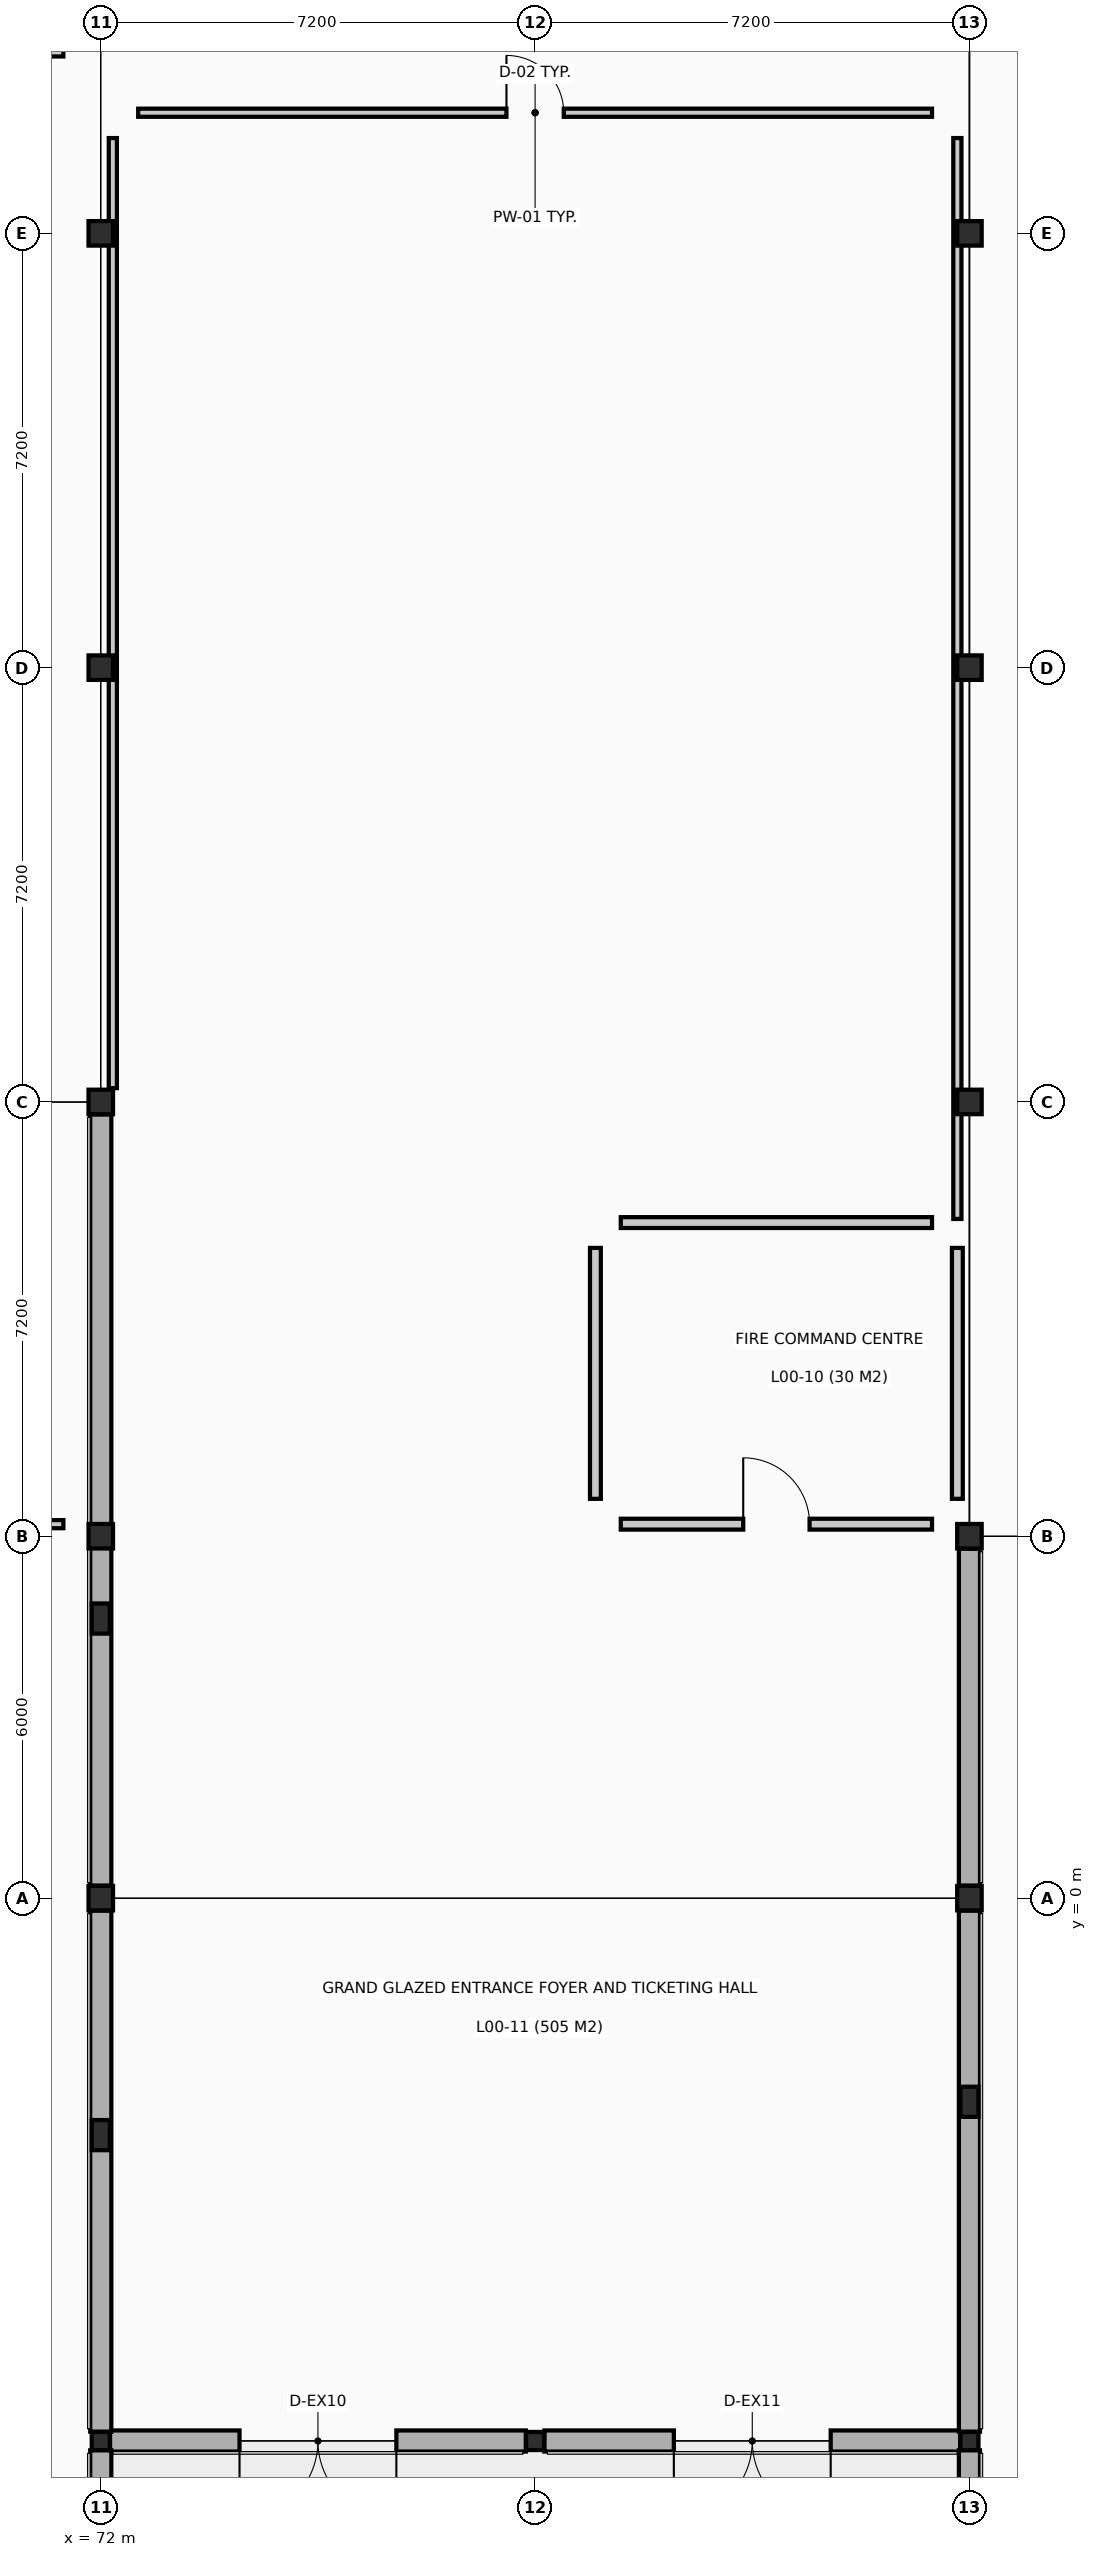
"""IFC4 building model, lengths in metres.
Left out: names, types, materials, properties, quantities, classifications, styles, units other than length and angle.
Written with IfcOpenShell. Run it as: python <this file> out.ifc"""

import sys

from ifc_helpers import new_model, si_unit, direction, frame, frame_2d, origin, origin_2d, place, context, subcontext, project, spatial, rectangle, hollow_rectangle, hollow_circle, i_section, extrude, element, fill, save


model = new_model("IFC4")
c1 = context("Model", 3, precision=1e-05, world=origin(), true_north=direction((0.0, 1.0)))
c2 = subcontext(c1, "Body", "Model", "MODEL_VIEW")
j1 = project(units=[si_unit("LENGTHUNIT", "METRE"), si_unit("PLANEANGLEUNIT", "RADIAN")], contexts=[c1])
p1 = place(None, origin())
s1 = spatial("IfcSite", under=j1, at=p1, CompositionType="ELEMENT")
p2 = place(p1, origin())
s2 = spatial("IfcBuilding", under=s1, at=p2, CompositionType="ELEMENT")
p3 = place(p2, origin())
s3 = spatial("IfcBuildingStorey", under=s2, at=p3, CompositionType="ELEMENT", Elevation=0.0)
for number, where, z_axis, x_axis in (
    (1, (72.0, 0.0, 0.0), (0.0, 0.0, 1.0), (1.0, 0.0, 0.0)),
    (2, (72.0, 6.0, 0.0), (0.0, 0.0, 1.0), (1.0, 0.0, 0.0)),
    (3, (72.0, 13.2, 0.0), (0.0, 0.0, 1.0), (1.0, 0.0, 0.0)),
    (4, (72.0, 20.4, 0.0), (0.0, 0.0, 1.0), (1.0, 0.0, 0.0)),
    (5, (72.0, 27.6, 0.0), (0.0, 0.0, 1.0), (1.0, 0.0, 0.0)),
    (6, (86.4, 0.0, 0.0), (0.0, 0.0, 1.0), (1.0, 0.0, 0.0)),
    (7, (86.4, 6.0, 0.0), (0.0, 0.0, 1.0), (1.0, 0.0, 0.0)),
    (8, (86.4, 13.2, 0.0), (0.0, 0.0, 1.0), (1.0, 0.0, 0.0)),
    (9, (86.4, 20.4, 0.0), (0.0, 0.0, 1.0), (1.0, 0.0, 0.0)),
    (10, (86.4, 27.6, 0.0), (0.0, 0.0, 1.0), (1.0, 0.0, 0.0)),
):
    element("IfcColumn", number, at=place(p3, frame(where, z_axis=z_axis, x_axis=x_axis)), inside=s3, PredefinedType="COLUMN", context=c2, shape_type="SweptSolid", body=[
        extrude(hollow_circle(Radius=0.203, WallThickness=0.016, at=origin_2d()), origin(), (0.0, 0.0, 1.0), 4.8),
    ])
for number, where, z_axis, x_axis in (
    (11, (72.0, -3.929, 0.0), (0.0, 0.0, 1.0), (1.0, 0.0, 0.0)),
    (12, (72.0, 4.635, 0.0), (0.0, 0.0, 1.0), (1.0, 0.0, 0.0)),
    (13, (86.4, -3.376, 0.0), (0.0, 0.0, 1.0), (1.0, 0.0, 0.0)),
):
    element("IfcColumn", number, at=place(p3, frame(where, z_axis=z_axis, x_axis=x_axis)), inside=s3, PredefinedType="COLUMN", context=c2, shape_type="SweptSolid", body=[
        extrude(i_section(OverallWidth=0.3, OverallDepth=0.5, WebThickness=0.014, FlangeThickness=0.028, at=origin_2d()), origin(), (0.0, 0.0, 1.0), 4.8),
    ])
for number, where, z_axis, x_axis in (
    (14, (72.0, -9.0, 0.0), (0.0, 0.0, 1.0), (1.0, 0.0, 0.0)),
    (15, (79.2, -9.0, 0.0), (0.0, 0.0, 1.0), (1.0, 0.0, 0.0)),
    (16, (86.4, -9.0, 0.0), (0.0, 0.0, 1.0), (1.0, 0.0, 0.0)),
):
    element("IfcColumn", number, at=place(p3, frame(where, z_axis=z_axis, x_axis=x_axis)), inside=s3, PredefinedType="COLUMN", context=c2, shape_type="SweptSolid", body=[
        extrude(hollow_rectangle(XDim=0.3, YDim=0.3, WallThickness=0.012, at=origin_2d()), origin(), (0.0, 0.0, 1.0), 4.8),
    ])
p4 = place(p3, frame((72.154, -9.0, 0.0), z_axis=(0.0, 0.0, 1.0), x_axis=(1.0, 0.0, 0.0)))
e17 = element("IfcWall", 17, at=p4, inside=s3, PredefinedType="SOLIDWALL", context=c2, shape_type="SweptSolid", body=[
    extrude(rectangle(XDim=6.892, YDim=0.35, at=frame_2d((3.446, 0.0))), origin(), (0.0, 0.0, 1.0), 4.065),
])
p5 = place(p4, frame((2.146, 0.0, 0.0)))
e18 = element("IfcOpeningElement", 18, at=p5, cuts=e17, PredefinedType="OPENING", context=c2, shape_type="SweptSolid", body=[
    extrude(rectangle(XDim=2.6, YDim=2.7, at=frame_2d((1.3, 1.35))), frame((0.0, 0.185, 0.0), z_axis=(0.0, -1.0, 0.0), x_axis=(1.0, 0.0, 0.0)), (0.0, 0.0, 1.0), 0.37),
])
p6 = place(p3, frame((79.354, -9.0, 0.0), z_axis=(0.0, 0.0, 1.0), x_axis=(1.0, 0.0, 0.0)))
e19 = element("IfcWall", 19, at=p6, inside=s3, PredefinedType="SOLIDWALL", context=c2, shape_type="SweptSolid", body=[
    extrude(rectangle(XDim=6.892, YDim=0.35, at=frame_2d((3.446, 0.0))), origin(), (0.0, 0.0, 1.0), 4.065),
])
p7 = place(p6, frame((2.146, 0.0, 0.0)))
e20 = element("IfcOpeningElement", 20, at=p7, cuts=e19, PredefinedType="OPENING", context=c2, shape_type="SweptSolid", body=[
    extrude(rectangle(XDim=2.6, YDim=2.7, at=frame_2d((1.3, 1.35))), frame((0.0, 0.185, 0.0), z_axis=(0.0, -1.0, 0.0), x_axis=(1.0, 0.0, 0.0)), (0.0, 0.0, 1.0), 0.37),
])
p8 = place(p3, frame((72.0, -12.599, 0.0), z_axis=(0.0, 0.0, 1.0), x_axis=(0.0, 1.0, 0.0)))
e21 = element("IfcWall", 21, at=p8, inside=s3, PredefinedType="SOLIDWALL", context=c2, shape_type="SweptSolid", body=[
    extrude(rectangle(XDim=3.445, YDim=0.35, at=frame_2d((1.722, 0.0))), origin(), (0.0, 0.0, 1.0), 4.115),
])
p9 = place(p3, frame((72.0, -8.846, 0.0), z_axis=(0.0, 0.0, 1.0), x_axis=(0.0, 1.0, 0.0)))
e22 = element("IfcWall", 22, at=p9, inside=s3, PredefinedType="SOLIDWALL", context=c2, shape_type="SweptSolid", body=[
    extrude(rectangle(XDim=8.639, YDim=0.35, at=frame_2d((4.319, 0.0))), origin(), (0.0, 0.0, 1.0), 4.115),
])
p10 = place(p3, frame((72.0, 0.207, 0.0), z_axis=(0.0, 0.0, 1.0), x_axis=(0.0, 1.0, 0.0)))
e23 = element("IfcWall", 23, at=p10, inside=s3, PredefinedType="SOLIDWALL", context=c2, shape_type="SweptSolid", body=[
    extrude(rectangle(XDim=12.786, YDim=0.35, at=frame_2d((6.393, 0.0))), origin(), (0.0, 0.0, 1.0), 4.115),
])
p11 = place(p3, frame((86.4, -12.599, 0.0), z_axis=(0.0, 0.0, 1.0), x_axis=(0.0, 1.0, 0.0)))
e24 = element("IfcWall", 24, at=p11, inside=s3, PredefinedType="SOLIDWALL", context=c2, shape_type="SweptSolid", body=[
    extrude(rectangle(XDim=3.445, YDim=0.35, at=frame_2d((1.722, 0.0))), origin(), (0.0, 0.0, 1.0), 4.115),
])
p12 = place(p3, frame((86.4, -8.846, 0.0), z_axis=(0.0, 0.0, 1.0), x_axis=(0.0, 1.0, 0.0)))
e25 = element("IfcWall", 25, at=p12, inside=s3, PredefinedType="SOLIDWALL", context=c2, shape_type="SweptSolid", body=[
    extrude(rectangle(XDim=8.639, YDim=0.35, at=frame_2d((4.319, 0.0))), origin(), (0.0, 0.0, 1.0), 4.115),
])
p13 = place(p3, frame((86.4, 0.207, 0.0), z_axis=(0.0, 0.0, 1.0), x_axis=(0.0, 1.0, 0.0)))
e26 = element("IfcWall", 26, at=p13, inside=s3, PredefinedType="SOLIDWALL", context=c2, shape_type="SweptSolid", body=[
    extrude(rectangle(XDim=5.585, YDim=0.35, at=frame_2d((2.793, 0.0))), origin(), (0.0, 0.0, 1.0), 4.115),
])
p14 = place(p3, frame((80.62, 6.2, 0.0), z_axis=(0.0, 0.0, 1.0), x_axis=(1.0, 0.0, 0.0)))
e27 = element("IfcWall", 27, at=p14, inside=s3, PredefinedType="PARTITIONING", context=c2, shape_type="SweptSolid", body=[
    extrude(rectangle(XDim=5.16, YDim=0.18, at=frame_2d((2.58, 0.0))), origin(), (0.0, 0.0, 1.0), 4.565),
])
p15 = place(p14, frame((2.03, 0.0, 0.0)))
e28 = element("IfcOpeningElement", 28, at=p15, cuts=e27, PredefinedType="OPENING", context=c2, shape_type="SweptSolid", body=[
    extrude(rectangle(XDim=1.1, YDim=2.15, at=frame_2d((0.55, 1.075))), frame((0.0, 0.1, 0.0), z_axis=(0.0, -1.0, 0.0), x_axis=(1.0, 0.0, 0.0)), (0.0, 0.0, 1.0), 0.2),
])
p16 = place(p3, frame((80.62, 11.2, 0.0), z_axis=(0.0, 0.0, 1.0), x_axis=(1.0, 0.0, 0.0)))
e29 = element("IfcWall", 29, at=p16, inside=s3, PredefinedType="PARTITIONING", context=c2, shape_type="SweptSolid", body=[
    extrude(rectangle(XDim=5.16, YDim=0.18, at=frame_2d((2.58, 0.0))), origin(), (0.0, 0.0, 1.0), 4.565),
])
p17 = place(p3, frame((80.2, 6.62, 0.0), z_axis=(0.0, 0.0, 1.0), x_axis=(0.0, 1.0, 0.0)))
e30 = element("IfcWall", 30, at=p17, inside=s3, PredefinedType="PARTITIONING", context=c2, shape_type="SweptSolid", body=[
    extrude(rectangle(XDim=4.16, YDim=0.18, at=frame_2d((2.08, 0.0))), origin(), (0.0, 0.0, 1.0), 4.565),
])
p18 = place(p3, frame((86.2, 6.62, 0.0), z_axis=(0.0, 0.0, 1.0), x_axis=(0.0, 1.0, 0.0)))
e31 = element("IfcWall", 31, at=p18, inside=s3, PredefinedType="PARTITIONING", context=c2, shape_type="SweptSolid", body=[
    extrude(rectangle(XDim=4.16, YDim=0.18, at=frame_2d((2.08, 0.0))), origin(), (0.0, 0.0, 1.0), 4.11),
])
p19 = place(p3, frame((72.62, 29.6, 0.0), z_axis=(0.0, 0.0, 1.0), x_axis=(1.0, 0.0, 0.0)))
e32 = element("IfcWall", 32, at=p19, inside=s3, PredefinedType="PARTITIONING", context=c2, shape_type="SweptSolid", body=[
    extrude(rectangle(XDim=13.16, YDim=0.135, at=frame_2d((6.58, 0.0))), origin(), (0.0, 0.0, 1.0), 4.565),
])
p20 = place(p19, frame((6.105, 0.0, 0.0)))
e33 = element("IfcOpeningElement", 33, at=p20, cuts=e32, PredefinedType="OPENING", context=c2, shape_type="SweptSolid", body=[
    extrude(rectangle(XDim=0.95, YDim=2.1, at=frame_2d((0.475, 1.05))), frame((0.0, 0.077, 0.0), z_axis=(0.0, -1.0, 0.0), x_axis=(1.0, 0.0, 0.0)), (0.0, 0.0, 1.0), 0.155),
])
p21 = place(p3, frame((72.2, 13.428, 0.0), z_axis=(0.0, 0.0, 1.0), x_axis=(0.0, 1.0, 0.0)))
e34 = element("IfcWall", 34, at=p21, inside=s3, PredefinedType="PARTITIONING", context=c2, shape_type="SweptSolid", body=[
    extrude(rectangle(XDim=15.751, YDim=0.135, at=frame_2d((7.876, 0.0))), origin(), (0.0, 0.0, 1.0), 4.11),
])
p22 = place(p3, frame((86.2, 11.26, 0.0), z_axis=(0.0, 0.0, 1.0), x_axis=(0.0, 1.0, 0.0)))
e35 = element("IfcWall", 35, at=p22, inside=s3, PredefinedType="PARTITIONING", context=c2, shape_type="SweptSolid", body=[
    extrude(rectangle(XDim=17.92, YDim=0.135, at=frame_2d((8.96, 0.0))), origin(), (0.0, 0.0, 1.0), 4.11),
])
p23 = place(p3, frame((58.02, 6.2, 0.0), z_axis=(0.0, 0.0, 1.0), x_axis=(1.0, 0.0, 0.0)))
e36 = element("IfcWall", 36, at=p23, inside=s3, PredefinedType="PARTITIONING", context=c2, shape_type="SweptSolid", body=[
    extrude(rectangle(XDim=13.36, YDim=0.135, at=frame_2d((6.68, 0.0))), origin(), (0.0, 0.0, 1.0), 4.06),
])
p24 = place(p23, frame((9.58, 0.0, 0.0)))
e37 = element("IfcOpeningElement", 37, at=p24, cuts=e36, PredefinedType="OPENING", context=c2, shape_type="SweptSolid", body=[
    extrude(rectangle(XDim=1.0, YDim=2.1, at=frame_2d((0.5, 1.05))), frame((0.0, 0.077, 0.0), z_axis=(0.0, -1.0, 0.0), x_axis=(1.0, 0.0, 0.0)), (0.0, 0.0, 1.0), 0.155),
])
p25 = place(p3, frame((58.02, 30.6, 0.0), z_axis=(0.0, 0.0, 1.0), x_axis=(1.0, 0.0, 0.0)))
e38 = element("IfcWall", 38, at=p25, inside=s3, PredefinedType="PARTITIONING", context=c2, shape_type="SweptSolid", body=[
    extrude(rectangle(XDim=13.36, YDim=0.135, at=frame_2d((6.68, 0.0))), origin(), (0.0, 0.0, 1.0), 4.565),
])
p26 = place(p5, frame((2.6, 0.0, 0.0), z_axis=(0.0, 0.0, 1.0), x_axis=(-1.0, 0.0, 0.0)))
e39 = element("IfcDoor", 39, at=p26, inside=s3, OperationType="DOUBLE_DOOR_SINGLE_SWING", PredefinedType="DOOR", context=c2, shape_type="SweptSolid", body=[
    extrude(rectangle(XDim=2.6, YDim=2.7, at=frame_2d((1.3, 1.35))), frame((0.0, 0.025, 0.0), z_axis=(0.0, -1.0, 0.0), x_axis=(1.0, 0.0, 0.0)), (0.0, 0.0, 1.0), 0.05),
])
fill(e18, e39)
p27 = place(p7, frame((2.6, 0.0, 0.0), z_axis=(0.0, 0.0, 1.0), x_axis=(-1.0, 0.0, 0.0)))
e40 = element("IfcDoor", 40, at=p27, inside=s3, OperationType="DOUBLE_DOOR_SINGLE_SWING", PredefinedType="DOOR", context=c2, shape_type="SweptSolid", body=[
    extrude(rectangle(XDim=2.6, YDim=2.7, at=frame_2d((1.3, 1.35))), frame((0.0, 0.025, 0.0), z_axis=(0.0, -1.0, 0.0), x_axis=(1.0, 0.0, 0.0)), (0.0, 0.0, 1.0), 0.05),
])
fill(e20, e40)
p28 = place(p15, origin())
e41 = element("IfcDoor", 41, at=p28, inside=s3, OperationType="SINGLE_SWING_LEFT", PredefinedType="DOOR", context=c2, shape_type="SweptSolid", body=[
    extrude(rectangle(XDim=1.1, YDim=2.15, at=frame_2d((0.55, 1.075))), frame((0.0, 0.025, 0.0), z_axis=(0.0, -1.0, 0.0), x_axis=(1.0, 0.0, 0.0)), (0.0, 0.0, 1.0), 0.05),
])
fill(e28, e41)
p29 = place(p20, frame((0.95, 0.0, 0.0), z_axis=(0.0, 0.0, 1.0), x_axis=(-1.0, 0.0, 0.0)))
e42 = element("IfcDoor", 42, at=p29, inside=s3, OperationType="SINGLE_SWING_RIGHT", PredefinedType="DOOR", context=c2, shape_type="SweptSolid", body=[
    extrude(rectangle(XDim=0.95, YDim=2.1, at=frame_2d((0.475, 1.05))), frame((0.0, 0.025, 0.0), z_axis=(0.0, -1.0, 0.0), x_axis=(1.0, 0.0, 0.0)), (0.0, 0.0, 1.0), 0.05),
])
fill(e33, e42)
save(model, sys.argv[1])
